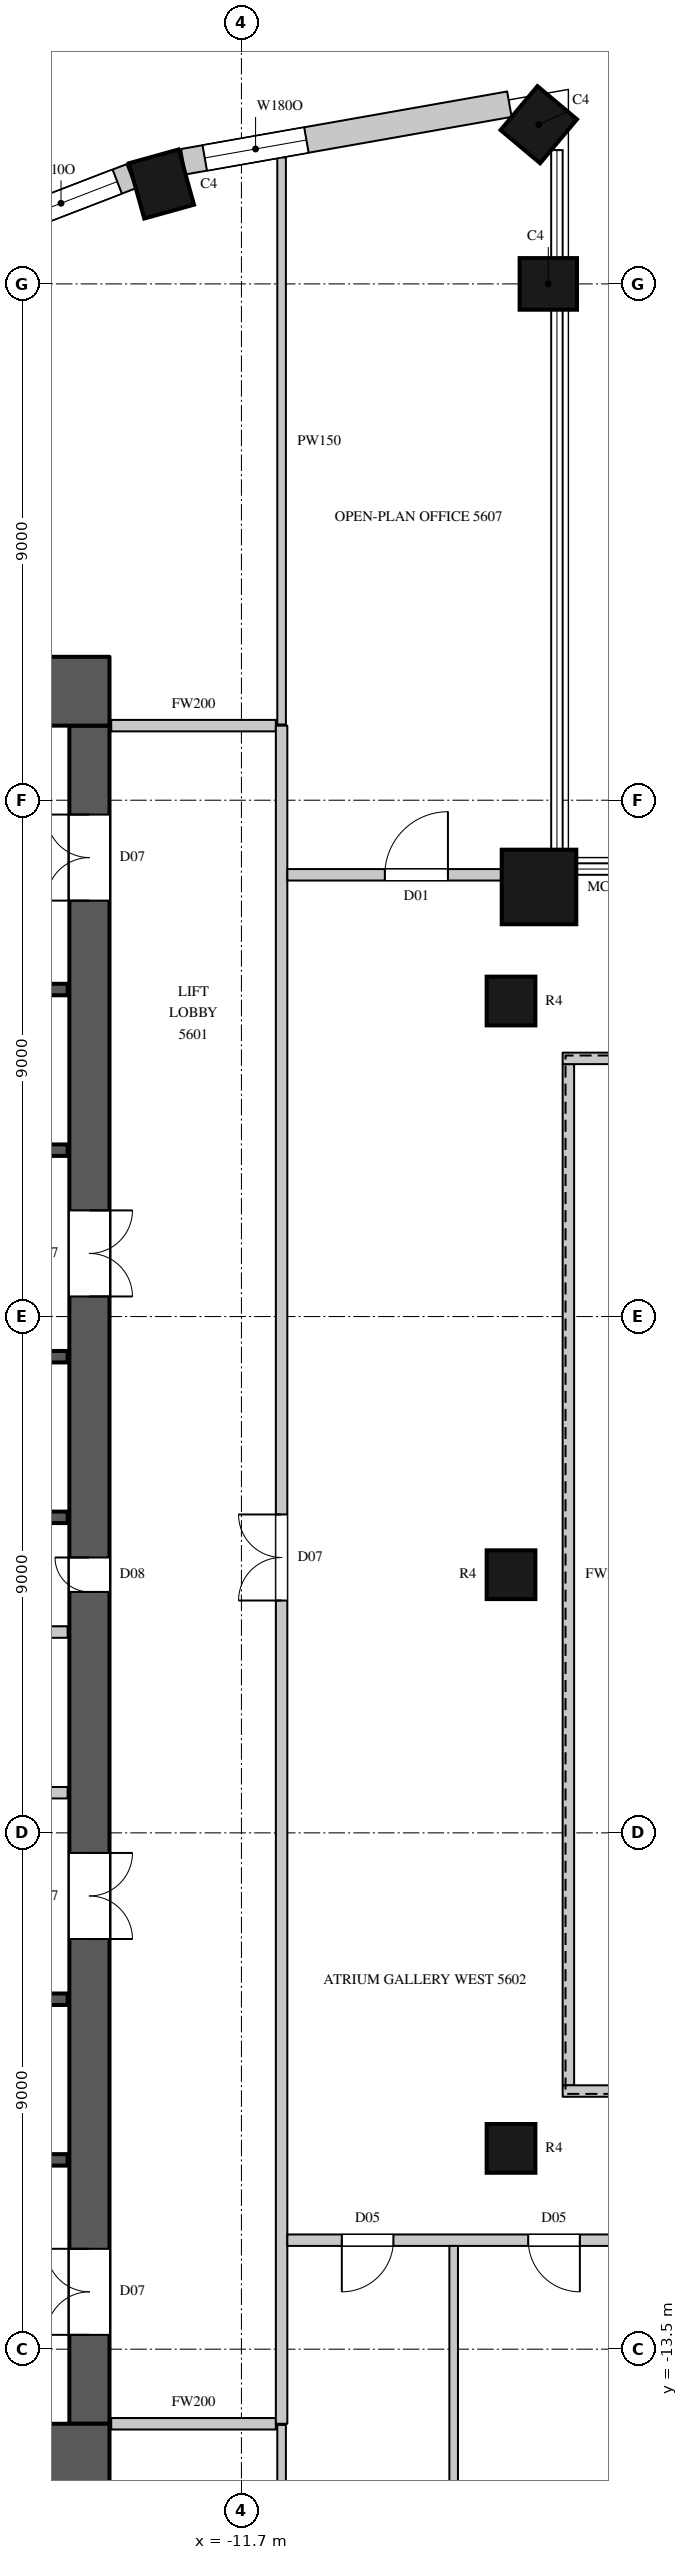
"""IFC4 building model, lengths in metres.
Left out: names, types, materials, properties, quantities, classifications, styles, units other than length and angle.
Written with IfcOpenShell. Run it as: python <this file> out.ifc"""

import sys

from ifc_helpers import new_model, si_unit, direction, frame, frame_2d, origin, origin_2d, place, context, subcontext, project, spatial, rectangle, circle, extrude, element, fill, save


model = new_model("IFC4")
c1 = context("Model", 3, precision=1e-05, world=origin(), true_north=direction((0.0, 1.0)))
c2 = subcontext(c1, "Body", "Model", "MODEL_VIEW")
j1 = project(units=[si_unit("LENGTHUNIT", "METRE"), si_unit("PLANEANGLEUNIT", "RADIAN")], contexts=[c1])
p1 = place(None, origin())
s1 = spatial("IfcSite", under=j1, at=p1, CompositionType="ELEMENT")
p2 = place(p1, origin())
s2 = spatial("IfcBuilding", under=s1, at=p2, CompositionType="ELEMENT")
p3 = place(p2, frame((0.0, 0.0, 251.6)))
s3 = spatial("IfcBuildingStorey", under=s2, at=p3, CompositionType="ELEMENT", Elevation=251.6)
p4 = place(p3, frame((-6.512, 11.988, 0.0), z_axis=(0.0, 0.0, 1.0), x_axis=(1.0, 0.0, 0.0)))
e1 = element("IfcColumn", 1, at=p4, inside=s3, PredefinedType="COLUMN", context=c2, shape_type="SweptSolid", body=[
    extrude(circle(Radius=0.65, at=origin_2d()), origin(), (0.0, 0.0, 1.0), 4.1),
])
for number, where, z_axis, x_axis in (
    (2, (-6.35, 22.5, 0.0), (0.0, 0.0, 1.0), (0.0, 1.0, 0.0)),
    (3, (-6.516, 25.275, 0.0), (0.0, 0.0, 1.0), (-0.766, 0.643, 0.0)),
    (4, (-13.095, 24.241, 0.0), (0.0, 0.0, 1.0), (-0.963, -0.268, 0.0)),
):
    element("IfcColumn", number, at=place(p3, frame(where, z_axis=z_axis, x_axis=x_axis)), inside=s3, PredefinedType="COLUMN", context=c2, shape_type="SweptSolid", body=[
        extrude(rectangle(XDim=0.9, YDim=1.0, at=origin_2d()), origin(), (0.0, 0.0, 1.0), 4.1),
    ])
for number, where, z_axis, x_axis in (
    (5, (-7.0, -10.0, 0.0), (0.0, 0.0, 1.0), (1.0, 0.0, 0.0)),
    (6, (-7.0, 0.0, 0.0), (0.0, 0.0, 1.0), (1.0, 0.0, 0.0)),
    (7, (-7.0, 10.0, 0.0), (0.0, 0.0, 1.0), (1.0, 0.0, 0.0)),
):
    element("IfcColumn", number, at=place(p3, frame(where, z_axis=z_axis, x_axis=x_axis)), inside=s3, PredefinedType="COLUMN", context=c2, shape_type="SweptSolid", body=[
        extrude(circle(Radius=0.425, at=origin_2d()), origin(), (0.0, 0.0, 1.0), 4.1),
    ])
p5 = place(p3, frame((-7.029, 25.632, 0.0), z_axis=(0.0, 0.0, 1.0), x_axis=(-0.984797606634, -0.173705710808, 0.0)))
e8 = element("IfcWall", 8, at=p5, inside=s3, PredefinedType="SOLIDWALL", context=c2, shape_type="SweptSolid", body=[
    extrude(rectangle(XDim=5.772, YDim=0.45, at=frame_2d((2.886, 0.0))), origin(), (0.0, 0.0, 1.0), 3.8),
])
p6 = place(p5, frame((3.593, 0.0, 1.05)))
e9 = element("IfcOpeningElement", 9, at=p6, cuts=e8, PredefinedType="OPENING", context=c2, shape_type="SweptSolid", body=[
    extrude(rectangle(XDim=1.8, YDim=2.4, at=frame_2d((0.9, 1.2))), frame((0.0, 0.235, 0.0), z_axis=(0.0, -1.0, 0.0), x_axis=(1.0, 0.0, 0.0)), (0.0, 0.0, 1.0), 0.47),
])
p7 = place(p3, frame((-13.622, 24.377, 0.0), z_axis=(0.0, 0.0, 1.0), x_axis=(-0.933129259679, -0.359541075164, 0.0)))
e10 = element("IfcWall", 10, at=p7, inside=s3, PredefinedType="SOLIDWALL", context=c2, shape_type="SweptSolid", body=[
    extrude(rectangle(XDim=6.054, YDim=0.45, at=frame_2d((3.027, 0.0))), origin(), (0.0, 0.0, 1.0), 3.8),
])
p8 = place(p7, frame((0.261, 0.0, 1.05)))
e11 = element("IfcOpeningElement", 11, at=p8, cuts=e10, PredefinedType="OPENING", context=c2, shape_type="SweptSolid", body=[
    extrude(rectangle(XDim=2.1, YDim=2.4, at=frame_2d((1.05, 1.2))), frame((0.0, 0.235, 0.0), z_axis=(0.0, -1.0, 0.0), x_axis=(1.0, 0.0, 0.0)), (0.0, 0.0, 1.0), 0.47),
])
for number, where, z_axis, x_axis in (
    (12, (-30.0, 15.4, 0.0), (0.0, 0.0, 1.0), (1.0, 0.0, 0.0)),
    (13, (-30.0, -15.4, 0.0), (0.0, 0.0, 1.0), (1.0, 0.0, 0.0)),
):
    element("IfcWall", number, at=place(p3, frame(where, z_axis=z_axis, x_axis=x_axis)), inside=s3, PredefinedType="SHEAR", context=c2, shape_type="SweptSolid", body=[
        extrude(rectangle(XDim=16.0, YDim=1.2, at=frame_2d((8.0, 0.0))), origin(), (0.0, 0.0, 1.0), 4.1),
    ])
p9 = place(p3, frame((-14.35, -14.8, 0.0), z_axis=(0.0, 0.0, 1.0), x_axis=(0.0, 1.0, 0.0)))
e14 = element("IfcWall", 14, at=p9, inside=s3, PredefinedType="SHEAR", context=c2, shape_type="SweptSolid", body=[
    extrude(rectangle(XDim=29.6, YDim=0.7, at=frame_2d((14.8, 0.0))), origin(), (0.0, 0.0, 1.0), 4.1),
])
p10 = place(p9, frame((1.55, 0.0, 0.0)))
e15 = element("IfcOpeningElement", 15, at=p10, cuts=e14, PredefinedType="OPENING", context=c2, shape_type="SweptSolid", body=[
    extrude(rectangle(XDim=1.5, YDim=2.4, at=frame_2d((0.75, 1.2))), frame((0.0, 0.36, 0.0), z_axis=(0.0, -1.0, 0.0), x_axis=(1.0, 0.0, 0.0)), (0.0, 0.0, 1.0), 0.72),
])
p11 = place(p9, frame((26.55, 0.0, 0.0)))
e16 = element("IfcOpeningElement", 16, at=p11, cuts=e14, PredefinedType="OPENING", context=c2, shape_type="SweptSolid", body=[
    extrude(rectangle(XDim=1.5, YDim=2.4, at=frame_2d((0.75, 1.2))), frame((0.0, 0.36, 0.0), z_axis=(0.0, -1.0, 0.0), x_axis=(1.0, 0.0, 0.0)), (0.0, 0.0, 1.0), 0.72),
])
p12 = place(p9, frame((8.45, 0.0, 0.0)))
e17 = element("IfcOpeningElement", 17, at=p12, cuts=e14, PredefinedType="OPENING", context=c2, shape_type="SweptSolid", body=[
    extrude(rectangle(XDim=1.5, YDim=2.4, at=frame_2d((0.75, 1.2))), frame((0.0, 0.36, 0.0), z_axis=(0.0, -1.0, 0.0), x_axis=(1.0, 0.0, 0.0)), (0.0, 0.0, 1.0), 0.72),
])
p13 = place(p9, frame((19.65, 0.0, 0.0)))
e18 = element("IfcOpeningElement", 18, at=p13, cuts=e14, PredefinedType="OPENING", context=c2, shape_type="SweptSolid", body=[
    extrude(rectangle(XDim=1.5, YDim=2.4, at=frame_2d((0.75, 1.2))), frame((0.0, 0.36, 0.0), z_axis=(0.0, -1.0, 0.0), x_axis=(1.0, 0.0, 0.0)), (0.0, 0.0, 1.0), 0.72),
])
p14 = place(p9, frame((14.5, 0.0, 0.0)))
e19 = element("IfcOpeningElement", 19, at=p14, cuts=e14, PredefinedType="OPENING", context=c2, shape_type="SweptSolid", body=[
    extrude(rectangle(XDim=0.6, YDim=2.0, at=frame_2d((0.3, 1.0))), frame((0.0, 0.36, 0.0), z_axis=(0.0, -1.0, 0.0), x_axis=(1.0, 0.0, 0.0)), (0.0, 0.0, 1.0), 0.72),
])
p15 = place(p3, frame((-21.38, -3.8, 0.0), z_axis=(0.0, 0.0, 1.0), x_axis=(1.0, 0.0, 0.0)))
e20 = element("IfcWall", 20, at=p15, inside=s3, PredefinedType="PARTITIONING", context=c2, shape_type="SweptSolid", body=[
    extrude(rectangle(XDim=6.65, YDim=0.2, at=frame_2d((3.325, 0.0))), origin(), (0.0, 0.0, 1.0), 3.8),
])
p16 = place(p15, frame((2.9, 0.0, 0.0)))
e21 = element("IfcOpeningElement", 21, at=p16, cuts=e20, PredefinedType="OPENING", context=c2, shape_type="SweptSolid", body=[
    extrude(rectangle(XDim=0.9, YDim=2.2, at=frame_2d((0.45, 1.1))), frame((0.0, 0.11, 0.0), z_axis=(0.0, -1.0, 0.0), x_axis=(1.0, 0.0, 0.0)), (0.0, 0.0, 1.0), 0.22),
])
for number, where, z_axis, x_axis in (
    (22, (-13.97, -14.8, 0.0), (0.0, 0.0, 1.0), (1.0, 0.0, 0.0)),
    (23, (-13.97, 14.8, 0.0), (0.0, 0.0, 1.0), (1.0, 0.0, 0.0)),
):
    element("IfcWall", number, at=place(p3, frame(where, z_axis=z_axis, x_axis=x_axis)), inside=s3, PredefinedType="PARTITIONING", context=c2, shape_type="SweptSolid", body=[
        extrude(rectangle(XDim=2.87, YDim=0.2, at=frame_2d((1.435, 0.0))), origin(), (0.0, 0.0, 1.0), 3.8),
    ])
p17 = place(p3, frame((-11.0, -14.8, 0.0), z_axis=(0.0, 0.0, 1.0), x_axis=(0.0, 1.0, 0.0)))
e24 = element("IfcWall", 24, at=p17, inside=s3, PredefinedType="PARTITIONING", context=c2, shape_type="SweptSolid", body=[
    extrude(rectangle(XDim=29.6, YDim=0.2, at=frame_2d((14.8, 0.0))), origin(), (0.0, 0.0, 1.0), 3.8),
])
p18 = place(p17, frame((14.35, 0.0, 0.0)))
e25 = element("IfcOpeningElement", 25, at=p18, cuts=e24, PredefinedType="OPENING", context=c2, shape_type="SweptSolid", body=[
    extrude(rectangle(XDim=1.5, YDim=2.4, at=frame_2d((0.75, 1.2))), frame((0.0, 0.11, 0.0), z_axis=(0.0, -1.0, 0.0), x_axis=(1.0, 0.0, 0.0)), (0.0, 0.0, 1.0), 0.22),
])
p19 = place(p3, frame((-10.9, -11.6, 0.0), z_axis=(0.0, 0.0, 1.0), x_axis=(1.0, 0.0, 0.0)))
e26 = element("IfcWall", 26, at=p19, inside=s3, PredefinedType="PARTITIONING", context=c2, shape_type="SweptSolid", body=[
    extrude(rectangle(XDim=21.4, YDim=0.2, at=frame_2d((10.7, 0.0))), origin(), (0.0, 0.0, 1.0), 3.8),
])
p20 = place(p19, frame((0.95, 0.0, 0.0)))
e27 = element("IfcOpeningElement", 27, at=p20, cuts=e26, PredefinedType="OPENING", context=c2, shape_type="SweptSolid", body=[
    extrude(rectangle(XDim=0.9, YDim=2.2, at=frame_2d((0.45, 1.1))), frame((0.0, 0.11, 0.0), z_axis=(0.0, -1.0, 0.0), x_axis=(1.0, 0.0, 0.0)), (0.0, 0.0, 1.0), 0.22),
])
p21 = place(p19, frame((4.2, 0.0, 0.0)))
e28 = element("IfcOpeningElement", 28, at=p21, cuts=e26, PredefinedType="OPENING", context=c2, shape_type="SweptSolid", body=[
    extrude(rectangle(XDim=0.9, YDim=2.2, at=frame_2d((0.45, 1.1))), frame((0.0, 0.11, 0.0), z_axis=(0.0, -1.0, 0.0), x_axis=(1.0, 0.0, 0.0)), (0.0, 0.0, 1.0), 0.22),
])
p22 = place(p19, frame((6.85, 0.0, 0.0)))
e29 = element("IfcOpeningElement", 29, at=p22, cuts=e26, PredefinedType="OPENING", context=c2, shape_type="SweptSolid", body=[
    extrude(rectangle(XDim=1.1, YDim=2.4, at=frame_2d((0.55, 1.2))), frame((0.0, 0.11, 0.0), z_axis=(0.0, -1.0, 0.0), x_axis=(1.0, 0.0, 0.0)), (0.0, 0.0, 1.0), 0.22),
])
p23 = place(p19, frame((9.8, 0.0, 0.0)))
e30 = element("IfcOpeningElement", 30, at=p23, cuts=e26, PredefinedType="OPENING", context=c2, shape_type="SweptSolid", body=[
    extrude(rectangle(XDim=1.1, YDim=2.4, at=frame_2d((0.55, 1.2))), frame((0.0, 0.11, 0.0), z_axis=(0.0, -1.0, 0.0), x_axis=(1.0, 0.0, 0.0)), (0.0, 0.0, 1.0), 0.22),
])
p24 = place(p3, frame((-10.9, 12.2, 0.0), z_axis=(0.0, 0.0, 1.0), x_axis=(1.0, 0.0, 0.0)))
e31 = element("IfcWall", 31, at=p24, inside=s3, PredefinedType="PARTITIONING", context=c2, shape_type="SweptSolid", body=[
    extrude(rectangle(XDim=3.756, YDim=0.2, at=frame_2d((1.878, 0.0))), origin(), (0.0, 0.0, 1.0), 3.8),
])
p25 = place(p24, frame((1.7, 0.0, 0.0)))
e32 = element("IfcOpeningElement", 32, at=p25, cuts=e31, PredefinedType="OPENING", context=c2, shape_type="SweptSolid", body=[
    extrude(rectangle(XDim=1.1, YDim=2.4, at=frame_2d((0.55, 1.2))), frame((0.0, 0.11, 0.0), z_axis=(0.0, -1.0, 0.0), x_axis=(1.0, 0.0, 0.0)), (0.0, 0.0, 1.0), 0.22),
])
p26 = place(p3, frame((-6.0, -8.9, 0.0), z_axis=(0.0, 0.0, 1.0), x_axis=(0.0, 1.0, 0.0)))
e33 = element("IfcWall", 33, at=p26, inside=s3, PredefinedType="PARTITIONING", context=c2, shape_type="SweptSolid", body=[
    extrude(rectangle(XDim=17.8, YDim=0.2, at=frame_2d((8.9, 0.0))), origin(), (0.0, 0.0, 1.0), 3.8),
])
for number, where, z_axis, x_axis in (
    (34, (-6.1, -9.0, 0.0), (0.0, 0.0, 1.0), (1.0, 0.0, 0.0)),
    (35, (-6.1, 9.0, 0.0), (0.0, 0.0, 1.0), (1.0, 0.0, 0.0)),
):
    element("IfcWall", number, at=place(p3, frame(where, z_axis=z_axis, x_axis=x_axis)), inside=s3, PredefinedType="PARTITIONING", context=c2, shape_type="SweptSolid", body=[
        extrude(rectangle(XDim=7.08, YDim=0.2, at=frame_2d((3.54, 0.0))), origin(), (0.0, 0.0, 1.0), 3.8),
    ])
p27 = place(p3, frame((-11.0, -23.757, 0.0), z_axis=(0.0, 0.0, 1.0), x_axis=(0.0, 1.0, 0.0)))
e36 = element("IfcWall", 36, at=p27, inside=s3, PredefinedType="PARTITIONING", context=c2, shape_type="SweptSolid", body=[
    extrude(rectangle(XDim=8.937, YDim=0.15, at=frame_2d((4.468, 0.0))), origin(), (0.0, 0.0, 1.0), 3.8),
])
p28 = place(p3, frame((-11.0, 14.82, 0.0), z_axis=(0.0, 0.0, 1.0), x_axis=(0.0, 1.0, 0.0)))
e37 = element("IfcWall", 37, at=p28, inside=s3, PredefinedType="PARTITIONING", context=c2, shape_type="SweptSolid", body=[
    extrude(rectangle(XDim=9.883, YDim=0.15, at=frame_2d((4.942, 0.0))), origin(), (0.0, 0.0, 1.0), 3.8),
])
p29 = place(p3, frame((-8.0, -24.04, 0.0), z_axis=(0.0, 0.0, 1.0), x_axis=(0.0, 1.0, 0.0)))
e38 = element("IfcWall", 38, at=p29, inside=s3, PredefinedType="PARTITIONING", context=c2, shape_type="SweptSolid", body=[
    extrude(rectangle(XDim=12.34, YDim=0.15, at=frame_2d((6.17, 0.0))), origin(), (0.0, 0.0, 1.0), 3.8),
])
p30 = place(p3, frame((-29.27, -1.0, 0.0), z_axis=(0.0, 0.0, 1.0), x_axis=(1.0, 0.0, 0.0)))
e39 = element("IfcWall", 39, at=p30, inside=s3, PredefinedType="PARTITIONING", context=c2, shape_type="SweptSolid", body=[
    extrude(rectangle(XDim=14.54, YDim=0.2, at=frame_2d((7.27, 0.0))), origin(), (0.0, 0.0, 1.0), 3.8),
])
p31 = place(p3, frame((-17.92, -10.2, 0.0), z_axis=(0.0, 0.0, 1.0), x_axis=(1.0, 0.0, 0.0)))
e40 = element("IfcWall", 40, at=p31, inside=s3, PredefinedType="SHEAR", context=c2, shape_type="SweptSolid", body=[
    extrude(rectangle(XDim=3.19, YDim=0.2, at=frame_2d((1.595, 0.0))), origin(), (0.0, 0.0, 1.0), 3.8),
])
p32 = place(p31, frame((1.05, 0.0, 0.0)))
e41 = element("IfcOpeningElement", 41, at=p32, cuts=e40, PredefinedType="OPENING", context=c2, shape_type="SweptSolid", body=[
    extrude(rectangle(XDim=1.1, YDim=2.2, at=frame_2d((0.55, 1.1))), frame((0.0, 0.11, 0.0), z_axis=(0.0, -1.0, 0.0), x_axis=(1.0, 0.0, 0.0)), (0.0, 0.0, 1.0), 0.22),
])
for number, where, z_axis, x_axis in (
    (42, (-17.9, -7.4, 0.0), (0.0, 0.0, 1.0), (1.0, 0.0, 0.0)),
    (43, (-17.9, 1.0, 0.0), (0.0, 0.0, 1.0), (1.0, 0.0, 0.0)),
):
    element("IfcWall", number, at=place(p3, frame(where, z_axis=z_axis, x_axis=x_axis)), inside=s3, PredefinedType="SHEAR", context=c2, shape_type="SweptSolid", body=[
        extrude(rectangle(XDim=3.17, YDim=0.2, at=frame_2d((1.585, 0.0))), origin(), (0.0, 0.0, 1.0), 3.8),
    ])
p33 = place(p3, frame((-17.9, 3.8, 0.0), z_axis=(0.0, 0.0, 1.0), x_axis=(1.0, 0.0, 0.0)))
e44 = element("IfcWall", 44, at=p33, inside=s3, PredefinedType="SHEAR", context=c2, shape_type="SweptSolid", body=[
    extrude(rectangle(XDim=3.17, YDim=0.2, at=frame_2d((1.585, 0.0))), origin(), (0.0, 0.0, 1.0), 3.8),
])
p34 = place(p33, frame((1.05, 0.0, 0.0)))
e45 = element("IfcOpeningElement", 45, at=p34, cuts=e44, PredefinedType="OPENING", context=c2, shape_type="SweptSolid", body=[
    extrude(rectangle(XDim=1.1, YDim=2.2, at=frame_2d((0.55, 1.1))), frame((0.0, 0.11, 0.0), z_axis=(0.0, -1.0, 0.0), x_axis=(1.0, 0.0, 0.0)), (0.0, 0.0, 1.0), 0.22),
])
p35 = place(p3, frame((-17.92, 7.4, 0.0), z_axis=(0.0, 0.0, 1.0), x_axis=(1.0, 0.0, 0.0)))
e46 = element("IfcWall", 46, at=p35, inside=s3, PredefinedType="SHEAR", context=c2, shape_type="SweptSolid", body=[
    extrude(rectangle(XDim=3.19, YDim=0.2, at=frame_2d((1.595, 0.0))), origin(), (0.0, 0.0, 1.0), 3.8),
])
p36 = place(p3, frame((-17.92, 10.2, 0.0), z_axis=(0.0, 0.0, 1.0), x_axis=(1.0, 0.0, 0.0)))
e47 = element("IfcWall", 47, at=p36, inside=s3, PredefinedType="SHEAR", context=c2, shape_type="SweptSolid", body=[
    extrude(rectangle(XDim=3.19, YDim=0.2, at=frame_2d((1.595, 0.0))), origin(), (0.0, 0.0, 1.0), 3.8),
])
p37 = place(p36, frame((1.05, 0.0, 0.0)))
e48 = element("IfcOpeningElement", 48, at=p37, cuts=e47, PredefinedType="OPENING", context=c2, shape_type="SweptSolid", body=[
    extrude(rectangle(XDim=1.1, YDim=2.2, at=frame_2d((0.55, 1.1))), frame((0.0, 0.11, 0.0), z_axis=(0.0, -1.0, 0.0), x_axis=(1.0, 0.0, 0.0)), (0.0, 0.0, 1.0), 0.22),
])
p38 = place(p6, origin())
e49 = element("IfcWindow", 49, at=p38, inside=s3, PartitioningType="SINGLE_PANEL", PredefinedType="WINDOW", context=c2, shape_type="SweptSolid", body=[
    extrude(rectangle(XDim=1.8, YDim=2.4, at=frame_2d((0.9, 1.2))), frame((0.0, 0.135, 0.0), z_axis=(0.0, -1.0, 0.0), x_axis=(1.0, 0.0, 0.0)), (0.0, 0.0, 1.0), 0.06),
])
fill(e9, e49)
p39 = place(p8, origin())
e50 = element("IfcWindow", 50, at=p39, inside=s3, PartitioningType="SINGLE_PANEL", PredefinedType="WINDOW", context=c2, shape_type="SweptSolid", body=[
    extrude(rectangle(XDim=2.1, YDim=2.4, at=frame_2d((1.05, 1.2))), frame((0.0, 0.135, 0.0), z_axis=(0.0, -1.0, 0.0), x_axis=(1.0, 0.0, 0.0)), (0.0, 0.0, 1.0), 0.06),
])
fill(e11, e50)
p40 = place(p18, origin())
e51 = element("IfcDoor", 51, at=p40, inside=s3, OperationType="DOUBLE_DOOR_SINGLE_SWING", PredefinedType="DOOR", context=c2, shape_type="SweptSolid", body=[
    extrude(rectangle(XDim=1.5, YDim=2.4, at=frame_2d((0.75, 1.2))), frame((0.0, 0.025, 0.0), z_axis=(0.0, -1.0, 0.0), x_axis=(1.0, 0.0, 0.0)), (0.0, 0.0, 1.0), 0.05),
])
fill(e25, e51)
p41 = place(p20, origin())
e52 = element("IfcDoor", 52, at=p41, inside=s3, OperationType="SINGLE_SWING_RIGHT", PredefinedType="DOOR", context=c2, shape_type="SweptSolid", body=[
    extrude(rectangle(XDim=0.9, YDim=2.2, at=frame_2d((0.45, 1.1))), frame((0.0, 0.025, 0.0), z_axis=(0.0, -1.0, 0.0), x_axis=(1.0, 0.0, 0.0)), (0.0, 0.0, 1.0), 0.05),
])
fill(e27, e52)
p42 = place(p21, origin())
e53 = element("IfcDoor", 53, at=p42, inside=s3, OperationType="SINGLE_SWING_LEFT", PredefinedType="DOOR", context=c2, shape_type="SweptSolid", body=[
    extrude(rectangle(XDim=0.9, YDim=2.2, at=frame_2d((0.45, 1.1))), frame((0.0, 0.025, 0.0), z_axis=(0.0, -1.0, 0.0), x_axis=(1.0, 0.0, 0.0)), (0.0, 0.0, 1.0), 0.05),
])
fill(e28, e53)
p43 = place(p25, origin())
e54 = element("IfcDoor", 54, at=p43, inside=s3, OperationType="SINGLE_SWING_RIGHT", PredefinedType="DOOR", context=c2, shape_type="SweptSolid", body=[
    extrude(rectangle(XDim=1.1, YDim=2.4, at=frame_2d((0.55, 1.2))), frame((0.0, 0.025, 0.0), z_axis=(0.0, -1.0, 0.0), x_axis=(1.0, 0.0, 0.0)), (0.0, 0.0, 1.0), 0.05),
])
fill(e32, e54)
p44 = place(p10, origin())
e55 = element("IfcDoor", 55, at=p44, inside=s3, OperationType="DOUBLE_DOOR_SINGLE_SWING", PredefinedType="DOOR", context=c2, shape_type="SweptSolid", body=[
    extrude(rectangle(XDim=1.5, YDim=2.4, at=frame_2d((0.75, 1.2))), frame((0.0, 0.345, 0.0), z_axis=(0.0, -1.0, 0.0), x_axis=(1.0, 0.0, 0.0)), (0.0, 0.0, 1.0), 0.05),
])
fill(e15, e55)
p45 = place(p11, origin())
e56 = element("IfcDoor", 56, at=p45, inside=s3, OperationType="DOUBLE_DOOR_SINGLE_SWING", PredefinedType="DOOR", context=c2, shape_type="SweptSolid", body=[
    extrude(rectangle(XDim=1.5, YDim=2.4, at=frame_2d((0.75, 1.2))), frame((0.0, 0.345, 0.0), z_axis=(0.0, -1.0, 0.0), x_axis=(1.0, 0.0, 0.0)), (0.0, 0.0, 1.0), 0.05),
])
fill(e16, e56)
p46 = place(p12, origin())
e57 = element("IfcDoor", 57, at=p46, inside=s3, OperationType="DOUBLE_DOOR_SINGLE_SWING", PredefinedType="DOOR", context=c2, shape_type="SweptSolid", body=[
    extrude(rectangle(XDim=1.5, YDim=2.4, at=frame_2d((0.75, 1.2))), frame((0.0, -0.295, 0.0), z_axis=(0.0, -1.0, 0.0), x_axis=(1.0, 0.0, 0.0)), (0.0, 0.0, 1.0), 0.05),
])
fill(e17, e57)
p47 = place(p13, origin())
e58 = element("IfcDoor", 58, at=p47, inside=s3, OperationType="DOUBLE_DOOR_SINGLE_SWING", PredefinedType="DOOR", context=c2, shape_type="SweptSolid", body=[
    extrude(rectangle(XDim=1.5, YDim=2.4, at=frame_2d((0.75, 1.2))), frame((0.0, -0.295, 0.0), z_axis=(0.0, -1.0, 0.0), x_axis=(1.0, 0.0, 0.0)), (0.0, 0.0, 1.0), 0.05),
])
fill(e18, e58)
p48 = place(p14, origin())
e59 = element("IfcDoor", 59, at=p48, inside=s3, OperationType="SINGLE_SWING_RIGHT", PredefinedType="DOOR", context=c2, shape_type="SweptSolid", body=[
    extrude(rectangle(XDim=0.6, YDim=2.0, at=frame_2d((0.3, 1.0))), frame((0.0, 0.345, 0.0), z_axis=(0.0, -1.0, 0.0), x_axis=(1.0, 0.0, 0.0)), (0.0, 0.0, 1.0), 0.05),
])
fill(e19, e59)
save(model, sys.argv[1])
